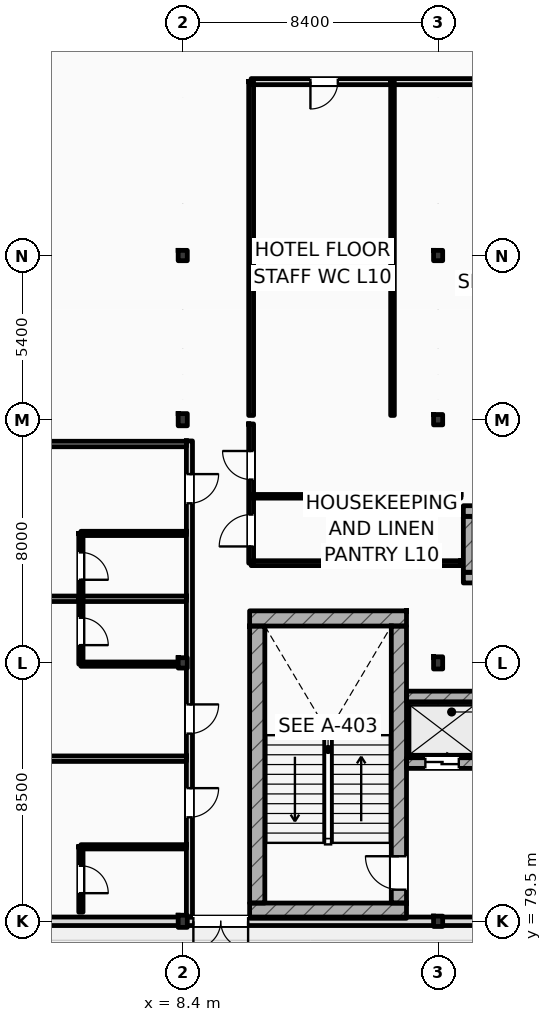
"""IFC4 building model, lengths in metres.
Left out: names, types, materials, properties, quantities, classifications, styles, units other than length and angle.
Written with IfcOpenShell. Run it as: python <this file> out.ifc"""

import sys

from ifc_helpers import new_model, si_unit, direction, frame, frame_2d, origin, origin_2d, place, context, subcontext, project, spatial, rectangle, i_section, extrude, element, fill, save


model = new_model("IFC4")
c1 = context("Model", 3, precision=1e-05, world=origin(), true_north=direction((0.0, 1.0)))
c2 = subcontext(c1, "Body", "Model", "MODEL_VIEW")
j1 = project(units=[si_unit("LENGTHUNIT", "METRE"), si_unit("PLANEANGLEUNIT", "RADIAN")], contexts=[c1])
p1 = place(None, origin())
s1 = spatial("IfcSite", under=j1, at=p1, CompositionType="ELEMENT")
p2 = place(p1, origin())
s2 = spatial("IfcBuilding", under=s1, at=p2, CompositionType="ELEMENT")
p3 = place(p2, frame((0.0, 0.0, 42.6)))
s3 = spatial("IfcBuildingStorey", under=s2, at=p3, CompositionType="ELEMENT", Elevation=42.6)
p4 = place(p3, frame((8.4, 79.5, 0.0), z_axis=(0.0, 0.0, 1.0), x_axis=(1.0, 0.0, 0.0)))
e1 = element("IfcColumn", 1, at=p4, inside=s3, PredefinedType="COLUMN", context=c2, shape_type="SweptSolid", body=[
    extrude(i_section(OverallWidth=0.3, OverallDepth=0.4, WebThickness=0.013, FlangeThickness=0.024, FilletRadius=0.027, at=origin_2d()), origin(), (0.0, 0.0, 1.0), 4.2),
])
p5 = place(p3, frame((8.4, 88.0, 0.0), z_axis=(0.0, 0.0, 1.0), x_axis=(1.0, 0.0, 0.0)))
e2 = element("IfcColumn", 2, at=p5, inside=s3, PredefinedType="COLUMN", context=c2, shape_type="SweptSolid", body=[
    extrude(i_section(OverallWidth=0.3, OverallDepth=0.34, WebThickness=0.012, FlangeThickness=0.021, FilletRadius=0.027, at=origin_2d()), origin(), (0.0, 0.0, 1.0), 4.2),
])
p6 = place(p3, frame((8.4, 96.0, 0.0), z_axis=(0.0, 0.0, 1.0), x_axis=(1.0, 0.0, 0.0)))
e3 = element("IfcColumn", 3, at=p6, inside=s3, PredefinedType="COLUMN", context=c2, shape_type="SweptSolid", body=[
    extrude(i_section(OverallWidth=0.3, OverallDepth=0.4, WebThickness=0.013, FlangeThickness=0.024, FilletRadius=0.027, at=origin_2d()), origin(), (0.0, 0.0, 1.0), 4.2),
])
p7 = place(p3, frame((16.8, 79.5, 0.0), z_axis=(0.0, 0.0, 1.0), x_axis=(1.0, 0.0, 0.0)))
e4 = element("IfcColumn", 4, at=p7, inside=s3, PredefinedType="COLUMN", context=c2, shape_type="SweptSolid", body=[
    extrude(i_section(OverallWidth=0.3, OverallDepth=0.34, WebThickness=0.012, FlangeThickness=0.021, FilletRadius=0.027, at=origin_2d()), origin(), (0.0, 0.0, 1.0), 4.2),
])
p8 = place(p3, frame((16.8, 88.0, 0.0), z_axis=(0.0, 0.0, 1.0), x_axis=(1.0, 0.0, 0.0)))
e5 = element("IfcColumn", 5, at=p8, inside=s3, PredefinedType="COLUMN", context=c2, shape_type="SweptSolid", body=[
    extrude(i_section(OverallWidth=0.3, OverallDepth=0.4, WebThickness=0.013, FlangeThickness=0.024, FilletRadius=0.027, at=origin_2d()), origin(), (0.0, 0.0, 1.0), 4.2),
])
for number, where, z_axis, x_axis in (
    (6, (16.8, 96.0, 0.0), (0.0, 0.0, 1.0), (1.0, 0.0, 0.0)),
    (7, (8.4, 101.4, 0.0), (0.0, 0.0, 1.0), (1.0, 0.0, 0.0)),
    (8, (16.8, 101.4, 0.0), (0.0, 0.0, 1.0), (1.0, 0.0, 0.0)),
):
    element("IfcColumn", number, at=place(p3, frame(where, z_axis=z_axis, x_axis=x_axis)), inside=s3, PredefinedType="COLUMN", context=c2, shape_type="SweptSolid", body=[
        extrude(i_section(OverallWidth=0.3, OverallDepth=0.34, WebThickness=0.012, FlangeThickness=0.021, FilletRadius=0.027, at=origin_2d()), origin(), (0.0, 0.0, 1.0), 4.2),
    ])
for number, where, z_axis, x_axis in (
    (9, (10.6, 89.462, 0.0), (0.0, 0.0, 1.0), (1.0, 0.0, 0.0)),
    (10, (10.6, 79.85, 0.0), (0.0, 0.0, 1.0), (1.0, 0.0, 0.0)),
):
    element("IfcWall", number, at=place(p3, frame(where, z_axis=z_axis, x_axis=x_axis)), inside=s3, PredefinedType="SHEAR", context=c2, shape_type="SweptSolid", body=[
        extrude(rectangle(XDim=5.16, YDim=0.5, at=frame_2d((2.58, 0.0))), origin(), (0.0, 0.0, 1.0), 4.2),
    ])
p9 = place(p3, frame((10.85, 80.1, 0.0), z_axis=(0.0, 0.0, 1.0), x_axis=(0.0, 1.0, 0.0)))
e11 = element("IfcWall", 11, at=p9, inside=s3, PredefinedType="SHEAR", context=c2, shape_type="SweptSolid", body=[
    extrude(rectangle(XDim=9.112, YDim=0.5, at=frame_2d((4.556, 0.0))), origin(), (0.0, 0.0, 1.0), 4.2),
])
p10 = place(p3, frame((15.51, 80.1, 0.0), z_axis=(0.0, 0.0, 1.0), x_axis=(0.0, 1.0, 0.0)))
e12 = element("IfcWall", 12, at=p10, inside=s3, PredefinedType="SHEAR", context=c2, shape_type="SweptSolid", body=[
    extrude(rectangle(XDim=9.112, YDim=0.5, at=frame_2d((4.556, 0.0))), origin(), (0.0, 0.0, 1.0), 4.2),
])
p11 = place(p10, frame((0.44, 0.0, 0.0)))
e13 = element("IfcOpeningElement", 13, at=p11, cuts=e12, PredefinedType="OPENING", context=c2, shape_type="SweptSolid", body=[
    extrude(rectangle(XDim=1.1, YDim=2.2, at=frame_2d((0.55, 1.1))), frame((0.0, 0.26, 0.0), z_axis=(0.0, -1.0, 0.0), x_axis=(1.0, 0.0, 0.0)), (0.0, 0.0, 1.0), 0.52),
])
p12 = place(p3, frame((0.0, 79.5, 0.0), z_axis=(0.0, 0.0, 1.0), x_axis=(1.0, 0.0, 0.0)))
e14 = element("IfcWall", 14, at=p12, inside=s3, PredefinedType="STANDARD", context=c2, shape_type="SweptSolid", body=[
    extrude(rectangle(XDim=25.2, YDim=0.28, at=frame_2d((12.6, 0.0))), origin(), (0.0, 0.0, 1.0), 3.38),
])
p13 = place(p12, frame((8.75, 0.0, 0.0)))
e15 = element("IfcOpeningElement", 15, at=p13, cuts=e14, PredefinedType="OPENING", context=c2, shape_type="SweptSolid", body=[
    extrude(rectangle(XDim=1.8, YDim=2.4, at=frame_2d((0.9, 1.2))), frame((0.0, 0.15, 0.0), z_axis=(0.0, -1.0, 0.0), x_axis=(1.0, 0.0, 0.0)), (0.0, 0.0, 1.0), 0.3),
])
p14 = place(p3, frame((15.76, 86.895, 0.0), z_axis=(0.0, 0.0, 1.0), x_axis=(1.0, 0.0, 0.0)))
e16 = element("IfcWall", 16, at=p14, inside=s3, PredefinedType="SHEAR", context=c2, shape_type="SweptSolid", body=[
    extrude(rectangle(XDim=2.69, YDim=0.35, at=frame_2d((1.345, 0.0))), origin(), (0.0, 0.0, 1.0), 3.94),
])
p15 = place(p3, frame((15.76, 84.705, 0.0), z_axis=(0.0, 0.0, 1.0), x_axis=(1.0, 0.0, 0.0)))
e17 = element("IfcWall", 17, at=p15, inside=s3, PredefinedType="SHEAR", context=c2, shape_type="SweptSolid", body=[
    extrude(rectangle(XDim=2.69, YDim=0.35, at=frame_2d((1.345, 0.0))), origin(), (0.0, 0.0, 1.0), 3.94),
])
p16 = place(p15, frame((0.62, 0.0, 0.0)))
e18 = element("IfcOpeningElement", 18, at=p16, cuts=e17, PredefinedType="OPENING", context=c2, shape_type="SweptSolid", body=[
    extrude(rectangle(XDim=1.1, YDim=2.2, at=frame_2d((0.55, 1.1))), frame((0.0, 0.185, 0.0), z_axis=(0.0, -1.0, 0.0), x_axis=(1.0, 0.0, 0.0)), (0.0, 0.0, 1.0), 0.37),
])
p17 = place(p3, frame((17.63, 92.995, 0.0), z_axis=(0.0, 0.0, 1.0), x_axis=(1.0, 0.0, 0.0)))
e19 = element("IfcWall", 19, at=p17, inside=s3, PredefinedType="SHEAR", context=c2, shape_type="SweptSolid", body=[
    extrude(rectangle(XDim=3.34, YDim=0.35, at=frame_2d((1.67, 0.0))), origin(), (0.0, 0.0, 1.0), 3.94),
])
p18 = place(p3, frame((17.63, 90.805, 0.0), z_axis=(0.0, 0.0, 1.0), x_axis=(1.0, 0.0, 0.0)))
e20 = element("IfcWall", 20, at=p18, inside=s3, PredefinedType="SHEAR", context=c2, shape_type="SweptSolid", body=[
    extrude(rectangle(XDim=3.34, YDim=0.35, at=frame_2d((1.67, 0.0))), origin(), (0.0, 0.0, 1.0), 3.94),
])
p19 = place(p18, frame((1.045, 0.0, 0.0)))
e21 = element("IfcOpeningElement", 21, at=p19, cuts=e20, PredefinedType="OPENING", context=c2, shape_type="SweptSolid", body=[
    extrude(rectangle(XDim=1.25, YDim=2.25, at=frame_2d((0.625, 1.125))), frame((0.0, 0.185, 0.0), z_axis=(0.0, -1.0, 0.0), x_axis=(1.0, 0.0, 0.0)), (0.0, 0.0, 1.0), 0.37),
])
p20 = place(p3, frame((17.805, 90.98, 0.0), z_axis=(0.0, 0.0, 1.0), x_axis=(0.0, 1.0, 0.0)))
e22 = element("IfcWall", 22, at=p20, inside=s3, PredefinedType="SHEAR", context=c2, shape_type="SweptSolid", body=[
    extrude(rectangle(XDim=1.84, YDim=0.35, at=frame_2d((0.92, 0.0))), origin(), (0.0, 0.0, 1.0), 3.94),
])
p21 = place(p3, frame((10.65, 107.12, 0.0), z_axis=(0.0, 0.0, 1.0), x_axis=(1.0, 0.0, 0.0)))
e23 = element("IfcWall", 23, at=p21, inside=s3, PredefinedType="PARTITIONING", context=c2, shape_type="SweptSolid", body=[
    extrude(rectangle(XDim=14.8, YDim=0.2, at=frame_2d((7.4, 0.0))), origin(), (0.0, 0.0, 1.0), 3.94),
])
p22 = place(p21, frame((1.95, 0.0, 0.0)))
e24 = element("IfcOpeningElement", 24, at=p22, cuts=e23, PredefinedType="OPENING", context=c2, shape_type="SweptSolid", body=[
    extrude(rectangle(XDim=0.9, YDim=2.1, at=frame_2d((0.45, 1.05))), frame((0.0, 0.11, 0.0), z_axis=(0.0, -1.0, 0.0), x_axis=(1.0, 0.0, 0.0)), (0.0, 0.0, 1.0), 0.22),
])
p23 = place(p21, frame((8.875, 0.0, 0.0)))
e25 = element("IfcOpeningElement", 25, at=p23, cuts=e23, PredefinedType="OPENING", context=c2, shape_type="SweptSolid", body=[
    extrude(rectangle(XDim=1.25, YDim=2.15, at=frame_2d((0.625, 1.075))), frame((0.0, 0.11, 0.0), z_axis=(0.0, -1.0, 0.0), x_axis=(1.0, 0.0, 0.0)), (0.0, 0.0, 1.0), 0.22),
])
p24 = place(p3, frame((8.62, 79.64, 0.0), z_axis=(0.0, 0.0, 1.0), x_axis=(0.0, 1.0, 0.0)))
e26 = element("IfcWall", 26, at=p24, inside=s3, PredefinedType="PARTITIONING", context=c2, shape_type="SweptSolid", body=[
    extrude(rectangle(XDim=15.66, YDim=0.2, at=frame_2d((7.83, 0.0))), origin(), (0.0, 0.0, 1.0), 3.57),
])
p25 = place(p24, frame((3.28, 0.0, 0.0)))
e27 = element("IfcOpeningElement", 27, at=p25, cuts=e26, PredefinedType="OPENING", context=c2, shape_type="SweptSolid", body=[
    extrude(rectangle(XDim=0.96, YDim=2.2, at=frame_2d((0.48, 1.1))), frame((0.0, 0.11, 0.0), z_axis=(0.0, -1.0, 0.0), x_axis=(1.0, 0.0, 0.0)), (0.0, 0.0, 1.0), 0.22),
])
p26 = place(p24, frame((6.034, 0.0, 0.0)))
e28 = element("IfcOpeningElement", 28, at=p26, cuts=e26, PredefinedType="OPENING", context=c2, shape_type="SweptSolid", body=[
    extrude(rectangle(XDim=0.96, YDim=2.2, at=frame_2d((0.48, 1.1))), frame((0.0, 0.11, 0.0), z_axis=(0.0, -1.0, 0.0), x_axis=(1.0, 0.0, 0.0)), (0.0, 0.0, 1.0), 0.22),
])
p27 = place(p24, frame((13.61, 0.0, 0.0)))
e29 = element("IfcOpeningElement", 29, at=p27, cuts=e26, PredefinedType="OPENING", context=c2, shape_type="SweptSolid", body=[
    extrude(rectangle(XDim=0.96, YDim=2.2, at=frame_2d((0.48, 1.1))), frame((0.0, 0.11, 0.0), z_axis=(0.0, -1.0, 0.0), x_axis=(1.0, 0.0, 0.0)), (0.0, 0.0, 1.0), 0.22),
])
p28 = place(p3, frame((10.65, 91.28, 0.0), z_axis=(0.0, 0.0, 1.0), x_axis=(0.0, 1.0, 0.0)))
e30 = element("IfcWall", 30, at=p28, inside=s3, PredefinedType="PARTITIONING", context=c2, shape_type="SweptSolid", body=[
    extrude(rectangle(XDim=4.58, YDim=0.16, at=frame_2d((2.29, 0.0))), origin(), (0.0, 0.0, 1.0), 3.94),
])
p29 = place(p28, frame((0.55, 0.0, 0.0)))
e31 = element("IfcOpeningElement", 31, at=p29, cuts=e30, PredefinedType="OPENING", context=c2, shape_type="SweptSolid", body=[
    extrude(rectangle(XDim=1.05, YDim=2.12, at=frame_2d((0.525, 1.06))), frame((0.0, 0.09, 0.0), z_axis=(0.0, -1.0, 0.0), x_axis=(1.0, 0.0, 0.0)), (0.0, 0.0, 1.0), 0.18),
])
p30 = place(p28, frame((2.75, 0.0, 0.0)))
e32 = element("IfcOpeningElement", 32, at=p30, cuts=e30, PredefinedType="OPENING", context=c2, shape_type="SweptSolid", body=[
    extrude(rectangle(XDim=0.94, YDim=2.15, at=frame_2d((0.47, 1.075))), frame((0.0, 0.09, 0.0), z_axis=(0.0, -1.0, 0.0), x_axis=(1.0, 0.0, 0.0)), (0.0, 0.0, 1.0), 0.18),
])
p31 = place(p3, frame((0.15, 84.849, 0.0), z_axis=(0.0, 0.0, 1.0), x_axis=(1.0, 0.0, 0.0)))
e33 = element("IfcWall", 33, at=p31, inside=s3, PredefinedType="PARTITIONING", context=c2, shape_type="SweptSolid", body=[
    extrude(rectangle(XDim=8.37, YDim=0.18, at=frame_2d((4.185, 0.0))), origin(), (0.0, 0.0, 1.0), 3.94),
])
p32 = place(p3, frame((5.05, 81.95, 0.0), z_axis=(0.0, 0.0, 1.0), x_axis=(1.0, 0.0, 0.0)))
e34 = element("IfcWall", 34, at=p32, inside=s3, PredefinedType="PARTITIONING", context=c2, shape_type="SweptSolid", body=[
    extrude(rectangle(XDim=3.47, YDim=0.14, at=frame_2d((1.735, 0.0))), origin(), (0.0, 0.0, 1.0), 3.94),
])
p33 = place(p3, frame((5.05, 79.8, 0.0), z_axis=(0.0, 0.0, 1.0), x_axis=(0.0, 1.0, 0.0)))
e35 = element("IfcWall", 35, at=p33, inside=s3, PredefinedType="PARTITIONING", context=c2, shape_type="SweptSolid", body=[
    extrude(rectangle(XDim=2.15, YDim=0.14, at=frame_2d((1.075, 0.0))), origin(), (0.0, 0.0, 1.0), 3.94),
])
p34 = place(p33, frame((0.625, 0.0, 0.0)))
e36 = element("IfcOpeningElement", 36, at=p34, cuts=e35, PredefinedType="OPENING", context=c2, shape_type="SweptSolid", body=[
    extrude(rectangle(XDim=0.9, YDim=2.1, at=frame_2d((0.45, 1.05))), frame((0.0, 0.08, 0.0), z_axis=(0.0, -1.0, 0.0), x_axis=(1.0, 0.0, 0.0)), (0.0, 0.0, 1.0), 0.16),
])
p35 = place(p3, frame((0.15, 90.109, 0.0), z_axis=(0.0, 0.0, 1.0), x_axis=(1.0, 0.0, 0.0)))
e37 = element("IfcWall", 37, at=p35, inside=s3, PredefinedType="PARTITIONING", context=c2, shape_type="SweptSolid", body=[
    extrude(rectangle(XDim=8.37, YDim=0.18, at=frame_2d((4.185, 0.0))), origin(), (0.0, 0.0, 1.0), 3.94),
])
p36 = place(p3, frame((5.05, 87.959, 0.0), z_axis=(0.0, 0.0, 1.0), x_axis=(1.0, 0.0, 0.0)))
e38 = element("IfcWall", 38, at=p36, inside=s3, PredefinedType="PARTITIONING", context=c2, shape_type="SweptSolid", body=[
    extrude(rectangle(XDim=3.47, YDim=0.14, at=frame_2d((1.735, 0.0))), origin(), (0.0, 0.0, 1.0), 3.38),
])
p37 = place(p3, frame((5.05, 87.959, 0.0), z_axis=(0.0, 0.0, 1.0), x_axis=(0.0, 1.0, 0.0)))
e39 = element("IfcWall", 39, at=p37, inside=s3, PredefinedType="PARTITIONING", context=c2, shape_type="SweptSolid", body=[
    extrude(rectangle(XDim=2.15, YDim=0.14, at=frame_2d((1.075, 0.0))), origin(), (0.0, 0.0, 1.0), 3.94),
])
p38 = place(p37, frame((0.625, 0.0, 0.0)))
e40 = element("IfcOpeningElement", 40, at=p38, cuts=e39, PredefinedType="OPENING", context=c2, shape_type="SweptSolid", body=[
    extrude(rectangle(XDim=0.9, YDim=2.1, at=frame_2d((0.45, 1.05))), frame((0.0, 0.08, 0.0), z_axis=(0.0, -1.0, 0.0), x_axis=(1.0, 0.0, 0.0)), (0.0, 0.0, 1.0), 0.16),
])
p39 = place(p3, frame((0.15, 95.2, 0.0), z_axis=(0.0, 0.0, 1.0), x_axis=(1.0, 0.0, 0.0)))
e41 = element("IfcWall", 41, at=p39, inside=s3, PredefinedType="PARTITIONING", context=c2, shape_type="SweptSolid", body=[
    extrude(rectangle(XDim=8.37, YDim=0.18, at=frame_2d((4.185, 0.0))), origin(), (0.0, 0.0, 1.0), 3.94),
])
p40 = place(p3, frame((5.05, 92.259, 0.0), z_axis=(0.0, 0.0, 1.0), x_axis=(1.0, 0.0, 0.0)))
e42 = element("IfcWall", 42, at=p40, inside=s3, PredefinedType="PARTITIONING", context=c2, shape_type="SweptSolid", body=[
    extrude(rectangle(XDim=3.47, YDim=0.14, at=frame_2d((1.735, 0.0))), origin(), (0.0, 0.0, 1.0), 3.94),
])
p41 = place(p3, frame((5.05, 90.109, 0.0), z_axis=(0.0, 0.0, 1.0), x_axis=(0.0, 1.0, 0.0)))
e43 = element("IfcWall", 43, at=p41, inside=s3, PredefinedType="PARTITIONING", context=c2, shape_type="SweptSolid", body=[
    extrude(rectangle(XDim=2.15, YDim=0.14, at=frame_2d((1.075, 0.0))), origin(), (0.0, 0.0, 1.0), 3.94),
])
p42 = place(p41, frame((0.625, 0.0, 0.0)))
e44 = element("IfcOpeningElement", 44, at=p42, cuts=e43, PredefinedType="OPENING", context=c2, shape_type="SweptSolid", body=[
    extrude(rectangle(XDim=0.9, YDim=2.1, at=frame_2d((0.45, 1.05))), frame((0.0, 0.08, 0.0), z_axis=(0.0, -1.0, 0.0), x_axis=(1.0, 0.0, 0.0)), (0.0, 0.0, 1.0), 0.16),
])
p43 = place(p3, frame((10.65, 91.28, 0.0), z_axis=(0.0, 0.0, 1.0), x_axis=(1.0, 0.0, 0.0)))
e45 = element("IfcWall", 45, at=p43, inside=s3, PredefinedType="PARTITIONING", context=c2, shape_type="SweptSolid", body=[
    extrude(rectangle(XDim=6.9, YDim=0.16, at=frame_2d((3.45, 0.0))), origin(), (0.0, 0.0, 1.0), 3.94),
])
p44 = place(p3, frame((10.65, 96.14, 0.0), z_axis=(0.0, 0.0, 1.0), x_axis=(0.0, 1.0, 0.0)))
e46 = element("IfcWall", 46, at=p44, inside=s3, PredefinedType="PARTITIONING", context=c2, shape_type="SweptSolid", body=[
    extrude(rectangle(XDim=10.98, YDim=0.16, at=frame_2d((5.49, 0.0))), origin(), (0.0, 0.0, 1.0), 3.94),
])
p45 = place(p3, frame((10.65, 93.48, 0.0), z_axis=(0.0, 0.0, 1.0), x_axis=(1.0, 0.0, 0.0)))
e47 = element("IfcWall", 47, at=p45, inside=s3, PredefinedType="PARTITIONING", context=c2, shape_type="SweptSolid", body=[
    extrude(rectangle(XDim=6.9, YDim=0.12, at=frame_2d((3.45, 0.0))), origin(), (0.0, 0.0, 1.0), 3.94),
])
p46 = place(p3, frame((15.3, 96.14, 0.0), z_axis=(0.0, 0.0, 1.0), x_axis=(0.0, 1.0, 0.0)))
e48 = element("IfcWall", 48, at=p46, inside=s3, PredefinedType="PARTITIONING", context=c2, shape_type="SweptSolid", body=[
    extrude(rectangle(XDim=10.98, YDim=0.12, at=frame_2d((5.49, 0.0))), origin(), (0.0, 0.0, 1.0), 3.94),
])
p47 = place(p13, frame((1.8, 0.0, 0.0), z_axis=(0.0, 0.0, 1.0), x_axis=(-1.0, 0.0, 0.0)))
e49 = element("IfcDoor", 49, at=p47, inside=s3, OperationType="DOUBLE_SWING_LEFT", PredefinedType="DOOR", context=c2, shape_type="SweptSolid", body=[
    extrude(rectangle(XDim=1.8, YDim=2.4, at=frame_2d((0.9, 1.2))), frame((0.0, 0.025, 0.0), z_axis=(0.0, -1.0, 0.0), x_axis=(1.0, 0.0, 0.0)), (0.0, 0.0, 1.0), 0.05),
])
fill(e15, e49)
p48 = place(p11, origin())
e50 = element("IfcDoor", 50, at=p48, inside=s3, OperationType="SINGLE_SWING_RIGHT", PredefinedType="DOOR", context=c2, shape_type="SweptSolid", body=[
    extrude(rectangle(XDim=1.1, YDim=2.2, at=frame_2d((0.55, 1.1))), frame((0.0, 0.025, 0.0), z_axis=(0.0, -1.0, 0.0), x_axis=(1.0, 0.0, 0.0)), (0.0, 0.0, 1.0), 0.05),
])
fill(e13, e50)
p49 = place(p16, origin())
e51 = element("IfcDoor", 51, at=p49, inside=s3, OperationType="SLIDING_TO_LEFT", PredefinedType="DOOR", context=c2, shape_type="SweptSolid", body=[
    extrude(rectangle(XDim=1.1, YDim=2.2, at=frame_2d((0.55, 1.1))), frame((0.0, 0.025, 0.0), z_axis=(0.0, -1.0, 0.0), x_axis=(1.0, 0.0, 0.0)), (0.0, 0.0, 1.0), 0.05),
])
fill(e18, e51)
p50 = place(p25, frame((0.96, 0.0, 0.0), z_axis=(0.0, 0.0, 1.0), x_axis=(-1.0, 0.0, 0.0)))
e52 = element("IfcDoor", 52, at=p50, inside=s3, OperationType="SINGLE_SWING_RIGHT", PredefinedType="DOOR", context=c2, shape_type="SweptSolid", body=[
    extrude(rectangle(XDim=0.96, YDim=2.2, at=frame_2d((0.48, 1.1))), frame((0.0, 0.025, 0.0), z_axis=(0.0, -1.0, 0.0), x_axis=(1.0, 0.0, 0.0)), (0.0, 0.0, 1.0), 0.05),
])
fill(e27, e52)
p51 = place(p34, frame((0.9, 0.0, 0.0), z_axis=(0.0, 0.0, 1.0), x_axis=(-1.0, 0.0, 0.0)))
e53 = element("IfcDoor", 53, at=p51, inside=s3, OperationType="SINGLE_SWING_LEFT", PredefinedType="DOOR", context=c2, shape_type="SweptSolid", body=[
    extrude(rectangle(XDim=0.9, YDim=2.1, at=frame_2d((0.45, 1.05))), frame((0.0, 0.025, 0.0), z_axis=(0.0, -1.0, 0.0), x_axis=(1.0, 0.0, 0.0)), (0.0, 0.0, 1.0), 0.05),
])
fill(e36, e53)
p52 = place(p26, frame((0.96, 0.0, 0.0), z_axis=(0.0, 0.0, 1.0), x_axis=(-1.0, 0.0, 0.0)))
e54 = element("IfcDoor", 54, at=p52, inside=s3, OperationType="SINGLE_SWING_RIGHT", PredefinedType="DOOR", context=c2, shape_type="SweptSolid", body=[
    extrude(rectangle(XDim=0.96, YDim=2.2, at=frame_2d((0.48, 1.1))), frame((0.0, 0.025, 0.0), z_axis=(0.0, -1.0, 0.0), x_axis=(1.0, 0.0, 0.0)), (0.0, 0.0, 1.0), 0.05),
])
fill(e28, e54)
p53 = place(p38, frame((0.9, 0.0, 0.0), z_axis=(0.0, 0.0, 1.0), x_axis=(-1.0, 0.0, 0.0)))
e55 = element("IfcDoor", 55, at=p53, inside=s3, OperationType="SINGLE_SWING_LEFT", PredefinedType="DOOR", context=c2, shape_type="SweptSolid", body=[
    extrude(rectangle(XDim=0.9, YDim=2.1, at=frame_2d((0.45, 1.05))), frame((0.0, 0.025, 0.0), z_axis=(0.0, -1.0, 0.0), x_axis=(1.0, 0.0, 0.0)), (0.0, 0.0, 1.0), 0.05),
])
fill(e40, e55)
p54 = place(p27, frame((0.96, 0.0, 0.0), z_axis=(0.0, 0.0, 1.0), x_axis=(-1.0, 0.0, 0.0)))
e56 = element("IfcDoor", 56, at=p54, inside=s3, OperationType="SINGLE_SWING_RIGHT", PredefinedType="DOOR", context=c2, shape_type="SweptSolid", body=[
    extrude(rectangle(XDim=0.96, YDim=2.2, at=frame_2d((0.48, 1.1))), frame((0.0, 0.025, 0.0), z_axis=(0.0, -1.0, 0.0), x_axis=(1.0, 0.0, 0.0)), (0.0, 0.0, 1.0), 0.05),
])
fill(e29, e56)
p55 = place(p42, frame((0.9, 0.0, 0.0), z_axis=(0.0, 0.0, 1.0), x_axis=(-1.0, 0.0, 0.0)))
e57 = element("IfcDoor", 57, at=p55, inside=s3, OperationType="SINGLE_SWING_LEFT", PredefinedType="DOOR", context=c2, shape_type="SweptSolid", body=[
    extrude(rectangle(XDim=0.9, YDim=2.1, at=frame_2d((0.45, 1.05))), frame((0.0, 0.025, 0.0), z_axis=(0.0, -1.0, 0.0), x_axis=(1.0, 0.0, 0.0)), (0.0, 0.0, 1.0), 0.05),
])
fill(e44, e57)
p56 = place(p29, origin())
e58 = element("IfcDoor", 58, at=p56, inside=s3, OperationType="SINGLE_SWING_LEFT", PredefinedType="DOOR", context=c2, shape_type="SweptSolid", body=[
    extrude(rectangle(XDim=1.05, YDim=2.12, at=frame_2d((0.525, 1.06))), frame((0.0, 0.025, 0.0), z_axis=(0.0, -1.0, 0.0), x_axis=(1.0, 0.0, 0.0)), (0.0, 0.0, 1.0), 0.05),
])
fill(e31, e58)
p57 = place(p30, origin())
e59 = element("IfcDoor", 59, at=p57, inside=s3, OperationType="SINGLE_SWING_RIGHT", PredefinedType="DOOR", context=c2, shape_type="SweptSolid", body=[
    extrude(rectangle(XDim=0.94, YDim=2.15, at=frame_2d((0.47, 1.075))), frame((0.0, 0.025, 0.0), z_axis=(0.0, -1.0, 0.0), x_axis=(1.0, 0.0, 0.0)), (0.0, 0.0, 1.0), 0.05),
])
fill(e32, e59)
p58 = place(p22, frame((0.9, 0.0, 0.0), z_axis=(0.0, 0.0, 1.0), x_axis=(-1.0, 0.0, 0.0)))
e60 = element("IfcDoor", 60, at=p58, inside=s3, OperationType="SINGLE_SWING_LEFT", PredefinedType="DOOR", context=c2, shape_type="SweptSolid", body=[
    extrude(rectangle(XDim=0.9, YDim=2.1, at=frame_2d((0.45, 1.05))), frame((0.0, 0.025, 0.0), z_axis=(0.0, -1.0, 0.0), x_axis=(1.0, 0.0, 0.0)), (0.0, 0.0, 1.0), 0.05),
])
fill(e24, e60)
save(model, sys.argv[1])
